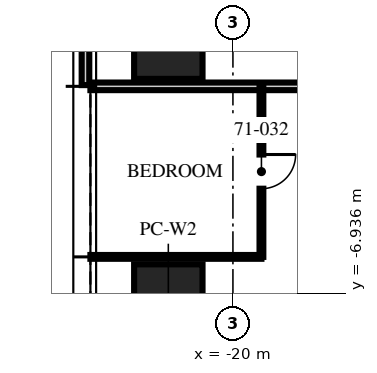
"""IFC4 building model, lengths in metres.
Left out: names, types, materials, properties, quantities, classifications, styles, units other than length and angle.
Written with IfcOpenShell. Run it as: python <this file> out.ifc"""

import sys

from ifc_helpers import new_model, si_unit, direction, frame, frame_2d, origin, origin_2d, place, context, subcontext, project, spatial, rectangle, extrude, element, fill, save


model = new_model("IFC4")
c1 = context("Model", 3, precision=1e-05, world=origin(), true_north=direction((0.0, 1.0)))
c2 = subcontext(c1, "Body", "Model", "MODEL_VIEW")
j1 = project(units=[si_unit("LENGTHUNIT", "METRE"), si_unit("PLANEANGLEUNIT", "RADIAN")], contexts=[c1])
p1 = place(None, origin())
s1 = spatial("IfcSite", under=j1, at=p1, CompositionType="ELEMENT")
p2 = place(p1, origin())
s2 = spatial("IfcBuilding", under=s1, at=p2, CompositionType="ELEMENT")
p3 = place(p2, frame((0.0, 0.0, 285.75)))
s3 = spatial("IfcBuildingStorey", under=s2, at=p3, CompositionType="ELEMENT", Elevation=285.75)
p4 = place(p3, frame((-21.7, -7.48, -0.09), z_axis=(0.0, 0.0, 1.0), x_axis=(0.0, 1.0, 0.0)))
e1 = element("IfcColumn", 1, at=p4, inside=s3, PredefinedType="COLUMN", context=c2, shape_type="SweptSolid", body=[
    extrude(rectangle(XDim=2.6, YDim=1.8, at=origin_2d()), origin(), (0.0, 0.0, 1.0), 3.84),
])
p5 = place(p3, frame((-21.7, 0.0, -0.23), z_axis=(0.0, 0.0, 1.0), x_axis=(0.0, 1.0, 0.0)))
e2 = element("IfcColumn", 2, at=p5, inside=s3, PredefinedType="COLUMN", context=c2, shape_type="SweptSolid", body=[
    extrude(rectangle(XDim=2.6, YDim=1.8, at=origin_2d()), origin(), (0.0, 0.0, 1.0), 3.98),
])
p6 = place(p3, frame((-23.88, 1.463, 0.0), z_axis=(0.0, 0.0, 1.0), x_axis=(0.0, -1.0, 0.0)))
e3 = element("IfcWall", 3, at=p6, inside=s3, PredefinedType="ELEMENTEDWALL", context=c2, shape_type="SweptSolid", body=[
    extrude(rectangle(XDim=2.927, YDim=0.2, at=frame_2d((1.463, 0.0))), origin(), (0.0, 0.0, 1.0), 3.75),
])
p7 = place(p6, frame((0.963, 0.0, 0.0)))
e4 = element("IfcOpeningElement", 4, at=p7, cuts=e3, PredefinedType="OPENING", context=c2, shape_type="SweptSolid", body=[
    extrude(rectangle(XDim=1.0, YDim=2.4, at=frame_2d((0.5, 1.2))), frame((0.0, 0.11, 0.0), z_axis=(0.0, -1.0, 0.0), x_axis=(1.0, 0.0, 0.0)), (0.0, 0.0, 1.0), 0.22),
])
p8 = place(p3, frame((-17.95, -1.496, 0.0), z_axis=(0.0, 0.0, 1.0), x_axis=(-1.0, 0.0, 0.0)))
e5 = element("IfcWall", 5, at=p8, inside=s3, PredefinedType="PARTITIONING", context=c2, shape_type="SweptSolid", body=[
    extrude(rectangle(XDim=5.8, YDim=0.2, at=frame_2d((2.9, 0.0))), origin(), (0.0, 0.0, 1.0), 3.01),
])
p9 = place(p3, frame((-19.25, -5.984, 0.0), z_axis=(0.0, 0.0, 1.0), x_axis=(-1.0, 0.0, 0.0)))
e6 = element("IfcWall", 6, at=p9, inside=s3, PredefinedType="PARTITIONING", context=c2, shape_type="SweptSolid", body=[
    extrude(rectangle(XDim=4.5, YDim=0.1, at=frame_2d((2.25, 0.0))), origin(), (0.0, 0.0, 1.0), 3.01),
])
p10 = place(p3, frame((-19.25, -1.496, 0.0), z_axis=(0.0, 0.0, 1.0), x_axis=(0.0, -1.0, 0.0)))
e7 = element("IfcWall", 7, at=p10, inside=s3, PredefinedType="PARTITIONING", context=c2, shape_type="SweptSolid", body=[
    extrude(rectangle(XDim=4.488, YDim=0.1, at=frame_2d((2.244, 0.0))), origin(), (0.0, 0.0, 1.0), 2.91),
])
p11 = place(p10, frame((1.794, 0.0, 0.0)))
e8 = element("IfcOpeningElement", 8, at=p11, cuts=e7, PredefinedType="OPENING", context=c2, shape_type="SweptSolid", body=[
    extrude(rectangle(XDim=0.9, YDim=2.1, at=frame_2d((0.45, 1.05))), frame((0.0, 0.06, 0.0), z_axis=(0.0, -1.0, 0.0), x_axis=(1.0, 0.0, 0.0)), (0.0, 0.0, 1.0), 0.12),
])
p12 = place(p11, origin())
e9 = element("IfcDoor", 9, at=p12, inside=s3, OperationType="SINGLE_SWING_LEFT", PredefinedType="DOOR", context=c2, shape_type="SweptSolid", body=[
    extrude(rectangle(XDim=0.9, YDim=2.1, at=frame_2d((0.45, 1.05))), frame((0.0, 0.025, 0.0), z_axis=(0.0, -1.0, 0.0), x_axis=(1.0, 0.0, 0.0)), (0.0, 0.0, 1.0), 0.05),
])
fill(e8, e9)
save(model, sys.argv[1])
